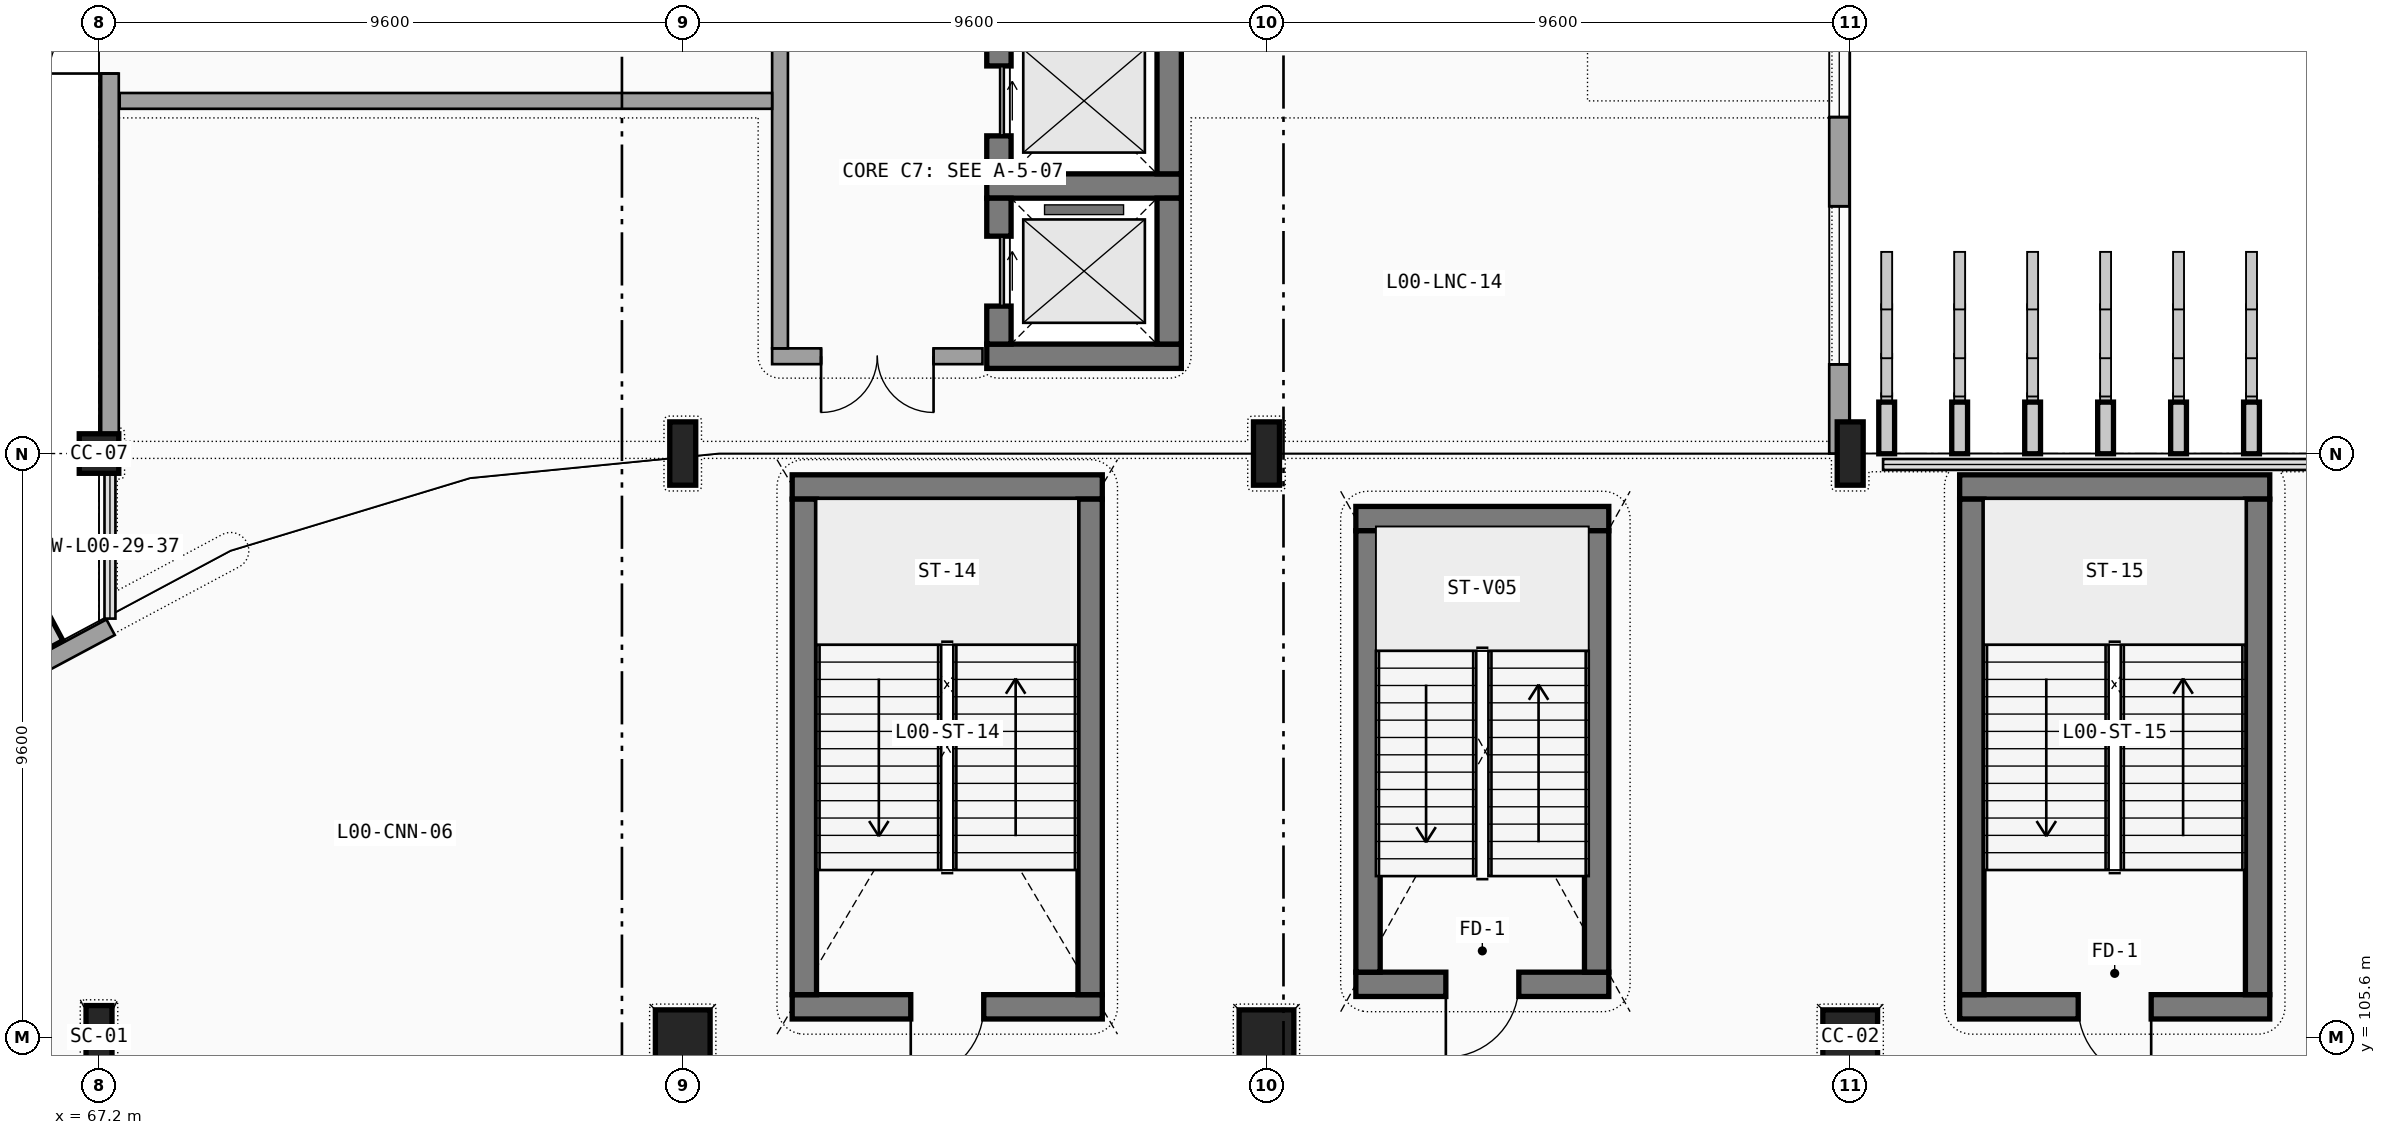
"""IFC4 building model, lengths in metres.
Left out: names, types, materials, properties, quantities, classifications, styles, units other than length and angle.
Written with IfcOpenShell. Run it as: python <this file> out.ifc"""

import sys

from ifc_helpers import new_model, si_unit, direction, frame, frame_2d, origin, origin_2d, place, context, subcontext, project, spatial, rectangle, i_section, extrude, element, fill, save


model = new_model("IFC4")
c1 = context("Model", 3, precision=1e-05, world=origin(), true_north=direction((0.0, 1.0)))
c2 = subcontext(c1, "Body", "Model", "MODEL_VIEW")
j1 = project(units=[si_unit("LENGTHUNIT", "METRE"), si_unit("PLANEANGLEUNIT", "RADIAN")], contexts=[c1])
p1 = place(None, origin())
s1 = spatial("IfcSite", under=j1, at=p1, CompositionType="ELEMENT")
p2 = place(p1, origin())
s2 = spatial("IfcBuilding", under=s1, at=p2, CompositionType="ELEMENT")
p3 = place(p2, origin())
s3 = spatial("IfcBuildingStorey", under=s2, at=p3, CompositionType="ELEMENT", Elevation=0.0)
p4 = place(p3, frame((67.2, 105.6, 0.0), z_axis=(0.0, 0.0, 1.0), x_axis=(1.0, 0.0, 0.0)))
e1 = element("IfcColumn", 1, at=p4, inside=s3, PredefinedType="COLUMN", context=c2, shape_type="SweptSolid", body=[
    extrude(i_section(OverallWidth=0.427, OverallDepth=1.042, WebThickness=0.031, FlangeThickness=0.056, FilletRadius=0.031, at=origin_2d()), origin(), (0.0, 0.0, 1.0), 4.8),
])
p5 = place(p3, frame((67.2, 115.2, 0.0), z_axis=(0.0, 0.0, 1.0), x_axis=(1.0, 0.0, 0.0)))
e2 = element("IfcColumn", 2, at=p5, inside=s3, PredefinedType="COLUMN", context=c2, shape_type="SweptSolid", body=[
    extrude(rectangle(XDim=0.65, YDim=0.65, at=origin_2d()), origin(), (0.0, 0.0, 1.0), 4.8),
])
p6 = place(p3, frame((76.8, 105.6, 0.0), z_axis=(0.0, 0.0, 1.0), x_axis=(1.0, 0.0, 0.0)))
e3 = element("IfcColumn", 3, at=p6, inside=s3, PredefinedType="COLUMN", context=c2, shape_type="SweptSolid", body=[
    extrude(rectangle(XDim=0.9, YDim=0.9, at=origin_2d()), origin(), (0.0, 0.0, 1.0), 4.8),
])
p7 = place(p3, frame((76.8, 115.2, 0.0), z_axis=(0.0, 0.0, 1.0), x_axis=(1.0, 0.0, 0.0)))
e4 = element("IfcColumn", 4, at=p7, inside=s3, PredefinedType="COLUMN", context=c2, shape_type="SweptSolid", body=[
    extrude(i_section(OverallWidth=0.427, OverallDepth=1.042, WebThickness=0.031, FlangeThickness=0.056, FilletRadius=0.031, at=origin_2d()), origin(), (0.0, 0.0, 1.0), 4.8),
])
p8 = place(p3, frame((86.4, 105.6, 0.0), z_axis=(0.0, 0.0, 1.0), x_axis=(1.0, 0.0, 0.0)))
e5 = element("IfcColumn", 5, at=p8, inside=s3, PredefinedType="COLUMN", context=c2, shape_type="SweptSolid", body=[
    extrude(rectangle(XDim=0.9, YDim=0.9, at=origin_2d()), origin(), (0.0, 0.0, 1.0), 4.8),
])
p9 = place(p3, frame((86.4, 115.2, 0.0), z_axis=(0.0, 0.0, 1.0), x_axis=(1.0, 0.0, 0.0)))
e6 = element("IfcColumn", 6, at=p9, inside=s3, PredefinedType="COLUMN", context=c2, shape_type="SweptSolid", body=[
    extrude(i_section(OverallWidth=0.427, OverallDepth=1.042, WebThickness=0.031, FlangeThickness=0.056, FilletRadius=0.031, at=origin_2d()), origin(), (0.0, 0.0, 1.0), 4.8),
])
p10 = place(p3, frame((96.0, 105.6, 0.0), z_axis=(0.0, 0.0, 1.0), x_axis=(1.0, 0.0, 0.0)))
e7 = element("IfcColumn", 7, at=p10, inside=s3, PredefinedType="COLUMN", context=c2, shape_type="SweptSolid", body=[
    extrude(rectangle(XDim=0.9, YDim=0.9, at=origin_2d()), origin(), (0.0, 0.0, 1.0), 4.8),
])
p11 = place(p3, frame((96.0, 115.2, 0.0), z_axis=(0.0, 0.0, 1.0), x_axis=(1.0, 0.0, 0.0)))
e8 = element("IfcColumn", 8, at=p11, inside=s3, PredefinedType="COLUMN", context=c2, shape_type="SweptSolid", body=[
    extrude(i_section(OverallWidth=0.427, OverallDepth=1.042, WebThickness=0.031, FlangeThickness=0.056, FilletRadius=0.031, at=origin_2d()), origin(), (0.0, 0.0, 1.0), 4.8),
])
p12 = place(p3, frame((67.38, 124.8, 0.0), z_axis=(0.0, 0.0, 1.0), x_axis=(0.0, -1.0, 0.0)))
e9 = element("IfcWall", 9, at=p12, inside=s3, PredefinedType="SOLIDWALL", context=c2, shape_type="SweptSolid", body=[
    extrude(rectangle(XDim=9.6, YDim=0.29, at=frame_2d((4.8, 0.0))), origin(), (0.0, 0.0, 1.0), 3.7),
])
p13 = place(p12, frame((3.35, 0.0, 0.0), z_axis=(0.0, 0.0, 1.0), x_axis=(-1.0, 0.0, 0.0)))
e10 = element("IfcOpeningElement", 10, at=p13, cuts=e9, PredefinedType="OPENING", context=c2, shape_type="SweptSolid", body=[
    extrude(rectangle(XDim=2.0, YDim=2.4, at=frame_2d((1.0, 1.2))), frame((0.0, 0.155, 0.0), z_axis=(0.0, -1.0, 0.0), x_axis=(1.0, 0.0, 0.0)), (0.0, 0.0, 1.0), 0.31),
])
p14 = place(p3, frame((67.391, 112.343, 0.0), z_axis=(0.0, 0.0, 1.0), x_axis=(-0.881883861215, -0.47146670649, 0.0)))
e11 = element("IfcWall", 11, at=p14, inside=s3, PredefinedType="SOLIDWALL", context=c2, shape_type="SweptSolid", body=[
    extrude(rectangle(XDim=1.904, YDim=0.29, at=frame_2d((0.952, 0.0))), origin(), (0.0, 0.0, 1.0), 3.7),
])
p15 = place(p3, frame((95.82, 115.2, 0.0), z_axis=(0.0, 0.0, 1.0), x_axis=(0.0, 1.0, 0.0)))
e12 = element("IfcWall", 12, at=p15, inside=s3, PredefinedType="SOLIDWALL", context=c2, shape_type="SweptSolid", body=[
    extrude(rectangle(XDim=9.6, YDim=0.33, at=frame_2d((4.8, 0.0))), origin(), (0.0, 0.0, 1.0), 3.573),
])
p16 = place(p15, frame((4.067, 0.0, 1.0), z_axis=(0.0, 0.0, 1.0), x_axis=(-1.0, 0.0, 0.0)))
e13 = element("IfcOpeningElement", 13, at=p16, cuts=e12, PredefinedType="OPENING", context=c2, shape_type="SweptSolid", body=[
    extrude(rectangle(XDim=2.6, YDim=2.0, at=frame_2d((1.3, 1.0))), frame((0.0, 0.175, 0.0), z_axis=(0.0, -1.0, 0.0), x_axis=(1.0, 0.0, 0.0)), (0.0, 0.0, 1.0), 0.35),
])
p17 = place(p15, frame((8.133, 0.0, 1.0), z_axis=(0.0, 0.0, 1.0), x_axis=(-1.0, 0.0, 0.0)))
e14 = element("IfcOpeningElement", 14, at=p17, cuts=e12, PredefinedType="OPENING", context=c2, shape_type="SweptSolid", body=[
    extrude(rectangle(XDim=2.6, YDim=2.0, at=frame_2d((1.3, 1.0))), frame((0.0, 0.175, 0.0), z_axis=(0.0, -1.0, 0.0), x_axis=(1.0, 0.0, 0.0)), (0.0, 0.0, 1.0), 0.35),
])
for number, where, z_axis, x_axis in (
    (15, (81.8, 116.8, 0.0), (0.0, 0.0, 1.0), (1.0, 0.0, 0.0)),
    (16, (85.0, 119.6, 0.0), (0.0, 0.0, 1.0), (-1.0, 0.0, 0.0)),
):
    element("IfcWall", number, at=place(p3, frame(where, z_axis=z_axis, x_axis=x_axis)), inside=s3, PredefinedType="SHEAR", context=c2, shape_type="SweptSolid", body=[
        extrude(rectangle(XDim=3.2, YDim=0.4, at=frame_2d((1.6, 0.0))), origin(), (0.0, 0.0, 1.0), 4.5),
    ])
p18 = place(p3, frame((82.0, 119.4, 0.0), z_axis=(0.0, 0.0, 1.0), x_axis=(0.0, -1.0, 0.0)))
e17 = element("IfcWall", 17, at=p18, inside=s3, PredefinedType="SHEAR", context=c2, shape_type="SweptSolid", body=[
    extrude(rectangle(XDim=2.4, YDim=0.4, at=frame_2d((1.2, 0.0))), origin(), (0.0, 0.0, 1.0), 4.5),
])
p19 = place(p18, frame((0.625, 0.0, 0.0), z_axis=(0.0, 0.0, 1.0), x_axis=(1.0, 0.0, 0.0)))
e18 = element("IfcOpeningElement", 18, at=p19, cuts=e17, PredefinedType="OPENING", context=c2, shape_type="SweptSolid", body=[
    extrude(rectangle(XDim=1.15, YDim=2.2, at=frame_2d((0.575, 1.1))), frame((0.0, 0.21, 0.0), z_axis=(0.0, -1.0, 0.0), x_axis=(1.0, 0.0, 0.0)), (0.0, 0.0, 1.0), 0.42),
])
p20 = place(p3, frame((84.8, 117.0, 0.0), z_axis=(0.0, 0.0, 1.0), x_axis=(0.0, 1.0, 0.0)))
e19 = element("IfcWall", 19, at=p20, inside=s3, PredefinedType="SHEAR", context=c2, shape_type="SweptSolid", body=[
    extrude(rectangle(XDim=2.4, YDim=0.4, at=frame_2d((1.2, 0.0))), origin(), (0.0, 0.0, 1.0), 4.5),
])
p21 = place(p3, frame((82.0, 122.2, 0.0), z_axis=(0.0, 0.0, 1.0), x_axis=(0.0, -1.0, 0.0)))
e20 = element("IfcWall", 20, at=p21, inside=s3, PredefinedType="SHEAR", context=c2, shape_type="SweptSolid", body=[
    extrude(rectangle(XDim=2.4, YDim=0.4, at=frame_2d((1.2, 0.0))), origin(), (0.0, 0.0, 1.0), 4.5),
])
p22 = place(p21, frame((0.625, 0.0, 0.0), z_axis=(0.0, 0.0, 1.0), x_axis=(1.0, 0.0, 0.0)))
e21 = element("IfcOpeningElement", 21, at=p22, cuts=e20, PredefinedType="OPENING", context=c2, shape_type="SweptSolid", body=[
    extrude(rectangle(XDim=1.15, YDim=2.2, at=frame_2d((0.575, 1.1))), frame((0.0, 0.21, 0.0), z_axis=(0.0, -1.0, 0.0), x_axis=(1.0, 0.0, 0.0)), (0.0, 0.0, 1.0), 0.42),
])
p23 = place(p3, frame((84.8, 119.8, 0.0), z_axis=(0.0, 0.0, 1.0), x_axis=(0.0, 1.0, 0.0)))
e22 = element("IfcWall", 22, at=p23, inside=s3, PredefinedType="SHEAR", context=c2, shape_type="SweptSolid", body=[
    extrude(rectangle(XDim=2.4, YDim=0.4, at=frame_2d((1.2, 0.0))), origin(), (0.0, 0.0, 1.0), 4.5),
])
p24 = place(p3, frame((78.27, 116.8, 0.0), z_axis=(0.0, 0.0, 1.0), x_axis=(1.0, 0.0, 0.0)))
e23 = element("IfcWall", 23, at=p24, inside=s3, PredefinedType="SOLIDWALL", context=c2, shape_type="SweptSolid", body=[
    extrude(rectangle(XDim=3.46, YDim=0.26, at=frame_2d((1.73, 0.0))), origin(), (0.0, 0.0, 1.0), 4.5),
])
p25 = place(p24, frame((2.655, 0.0, 0.0), z_axis=(0.0, 0.0, 1.0), x_axis=(-1.0, 0.0, 0.0)))
e24 = element("IfcOpeningElement", 24, at=p25, cuts=e23, PredefinedType="OPENING", context=c2, shape_type="SweptSolid", body=[
    extrude(rectangle(XDim=1.85, YDim=2.25, at=frame_2d((0.925, 1.125))), frame((0.0, 0.14, 0.0), z_axis=(0.0, -1.0, 0.0), x_axis=(1.0, 0.0, 0.0)), (0.0, 0.0, 1.0), 0.28),
])
p26 = place(p3, frame((78.4, 122.27, 0.0), z_axis=(0.0, 0.0, 1.0), x_axis=(0.0, -1.0, 0.0)))
e25 = element("IfcWall", 25, at=p26, inside=s3, PredefinedType="SOLIDWALL", context=c2, shape_type="SweptSolid", body=[
    extrude(rectangle(XDim=5.34, YDim=0.26, at=frame_2d((2.67, 0.0))), origin(), (0.0, 0.0, 1.0), 4.5),
])
p27 = place(p3, frame((78.6, 106.1, 0.0), z_axis=(0.0, 0.0, 1.0), x_axis=(1.0, 0.0, 0.0)))
e26 = element("IfcWall", 26, at=p27, inside=s3, PredefinedType="SHEAR", context=c2, shape_type="SweptSolid", body=[
    extrude(rectangle(XDim=5.1, YDim=0.4, at=frame_2d((2.55, 0.0))), origin(), (0.0, 0.0, 1.0), 4.5),
])
p28 = place(p27, frame((3.15, 0.0, 0.0), z_axis=(0.0, 0.0, 1.0), x_axis=(-1.0, 0.0, 0.0)))
e27 = element("IfcOpeningElement", 27, at=p28, cuts=e26, PredefinedType="OPENING", context=c2, shape_type="SweptSolid", body=[
    extrude(rectangle(XDim=1.2, YDim=2.2, at=frame_2d((0.6, 1.1))), frame((0.0, 0.21, 0.0), z_axis=(0.0, -1.0, 0.0), x_axis=(1.0, 0.0, 0.0)), (0.0, 0.0, 1.0), 0.42),
])
p29 = place(p3, frame((83.7, 114.65, 0.0), z_axis=(0.0, 0.0, 1.0), x_axis=(-1.0, 0.0, 0.0)))
e28 = element("IfcWall", 28, at=p29, inside=s3, PredefinedType="SHEAR", context=c2, shape_type="SweptSolid", body=[
    extrude(rectangle(XDim=5.1, YDim=0.4, at=frame_2d((2.55, 0.0))), origin(), (0.0, 0.0, 1.0), 4.5),
])
for number, where, z_axis, x_axis in (
    (29, (78.8, 114.45, 0.0), (0.0, 0.0, 1.0), (0.0, -1.0, 0.0)),
    (30, (83.5, 106.3, 0.0), (0.0, 0.0, 1.0), (0.0, 1.0, 0.0)),
):
    element("IfcWall", number, at=place(p3, frame(where, z_axis=z_axis, x_axis=x_axis)), inside=s3, PredefinedType="SHEAR", context=c2, shape_type="SweptSolid", body=[
        extrude(rectangle(XDim=8.15, YDim=0.4, at=frame_2d((4.075, 0.0))), origin(), (0.0, 0.0, 1.0), 4.5),
    ])
p30 = place(p3, frame((97.8, 106.1, 0.0), z_axis=(0.0, 0.0, 1.0), x_axis=(1.0, 0.0, 0.0)))
e31 = element("IfcWall", 31, at=p30, inside=s3, PredefinedType="SHEAR", context=c2, shape_type="SweptSolid", body=[
    extrude(rectangle(XDim=5.1, YDim=0.4, at=frame_2d((2.55, 0.0))), origin(), (0.0, 0.0, 1.0), 4.5),
])
p31 = place(p30, frame((3.15, 0.0, 0.0), z_axis=(0.0, 0.0, 1.0), x_axis=(-1.0, 0.0, 0.0)))
e32 = element("IfcOpeningElement", 32, at=p31, cuts=e31, PredefinedType="OPENING", context=c2, shape_type="SweptSolid", body=[
    extrude(rectangle(XDim=1.2, YDim=2.2, at=frame_2d((0.6, 1.1))), frame((0.0, 0.21, 0.0), z_axis=(0.0, -1.0, 0.0), x_axis=(1.0, 0.0, 0.0)), (0.0, 0.0, 1.0), 0.42),
])
p32 = place(p3, frame((102.9, 114.65, 0.0), z_axis=(0.0, 0.0, 1.0), x_axis=(-1.0, 0.0, 0.0)))
e33 = element("IfcWall", 33, at=p32, inside=s3, PredefinedType="SHEAR", context=c2, shape_type="SweptSolid", body=[
    extrude(rectangle(XDim=5.1, YDim=0.4, at=frame_2d((2.55, 0.0))), origin(), (0.0, 0.0, 1.0), 4.5),
])
for number, where, z_axis, x_axis in (
    (34, (98.0, 114.45, 0.0), (0.0, 0.0, 1.0), (0.0, -1.0, 0.0)),
    (35, (102.7, 106.3, 0.0), (0.0, 0.0, 1.0), (0.0, 1.0, 0.0)),
):
    element("IfcWall", number, at=place(p3, frame(where, z_axis=z_axis, x_axis=x_axis)), inside=s3, PredefinedType="SHEAR", context=c2, shape_type="SweptSolid", body=[
        extrude(rectangle(XDim=8.15, YDim=0.4, at=frame_2d((4.075, 0.0))), origin(), (0.0, 0.0, 1.0), 4.5),
    ])
p33 = place(p3, frame((87.87, 106.47, 0.0), z_axis=(0.0, 0.0, 1.0), x_axis=(1.0, 0.0, 0.0)))
e36 = element("IfcWall", 36, at=p33, inside=s3, PredefinedType="SHEAR", context=c2, shape_type="SweptSolid", body=[
    extrude(rectangle(XDim=4.16, YDim=0.4, at=frame_2d((2.08, 0.0))), origin(), (0.0, 0.0, 1.0), 4.5),
])
p34 = place(p33, frame((2.68, 0.0, 0.0), z_axis=(0.0, 0.0, 1.0), x_axis=(-1.0, 0.0, 0.0)))
e37 = element("IfcOpeningElement", 37, at=p34, cuts=e36, PredefinedType="OPENING", context=c2, shape_type="SweptSolid", body=[
    extrude(rectangle(XDim=1.2, YDim=2.2, at=frame_2d((0.6, 1.1))), frame((0.0, 0.21, 0.0), z_axis=(0.0, -1.0, 0.0), x_axis=(1.0, 0.0, 0.0)), (0.0, 0.0, 1.0), 0.42),
])
p35 = place(p3, frame((92.03, 114.13, 0.0), z_axis=(0.0, 0.0, 1.0), x_axis=(-1.0, 0.0, 0.0)))
e38 = element("IfcWall", 38, at=p35, inside=s3, PredefinedType="SHEAR", context=c2, shape_type="SweptSolid", body=[
    extrude(rectangle(XDim=4.16, YDim=0.4, at=frame_2d((2.08, 0.0))), origin(), (0.0, 0.0, 1.0), 4.5),
])
for number, where, z_axis, x_axis in (
    (39, (88.07, 113.93, 0.0), (0.0, 0.0, 1.0), (0.0, -1.0, 0.0)),
    (40, (91.83, 106.67, 0.0), (0.0, 0.0, 1.0), (0.0, 1.0, 0.0)),
):
    element("IfcWall", number, at=place(p3, frame(where, z_axis=z_axis, x_axis=x_axis)), inside=s3, PredefinedType="SHEAR", context=c2, shape_type="SweptSolid", body=[
        extrude(rectangle(XDim=7.26, YDim=0.4, at=frame_2d((3.63, 0.0))), origin(), (0.0, 0.0, 1.0), 4.5),
    ])
p36 = place(p3, frame((67.54, 121.0, 0.0), z_axis=(0.0, 0.0, 1.0), x_axis=(1.0, 0.0, 0.0)))
e41 = element("IfcWall", 41, at=p36, inside=s3, PredefinedType="SOLIDWALL", context=c2, shape_type="SweptSolid", body=[
    extrude(rectangle(XDim=10.73, YDim=0.26, at=frame_2d((5.365, 0.0))), origin(), (0.0, 0.0, 1.0), 3.7),
])
p37 = place(p13, origin())
e42 = element("IfcDoor", 42, at=p37, inside=s3, OperationType="DOUBLE_DOOR_SINGLE_SWING", PredefinedType="DOOR", context=c2, shape_type="SweptSolid", body=[
    extrude(rectangle(XDim=2.0, YDim=2.4, at=frame_2d((1.0, 1.2))), frame((0.0, 0.025, 0.0), z_axis=(0.0, -1.0, 0.0), x_axis=(1.0, 0.0, 0.0)), (0.0, 0.0, 1.0), 0.05),
])
fill(e10, e42)
p38 = place(p16, origin())
e43 = element("IfcWindow", 43, at=p38, inside=s3, PartitioningType="SINGLE_PANEL", PredefinedType="WINDOW", context=c2, shape_type="SweptSolid", body=[
    extrude(rectangle(XDim=2.6, YDim=2.0, at=frame_2d((1.3, 1.0))), frame((0.0, 0.03, 0.0), z_axis=(0.0, -1.0, 0.0), x_axis=(1.0, 0.0, 0.0)), (0.0, 0.0, 1.0), 0.06),
])
fill(e13, e43)
p39 = place(p17, origin())
e44 = element("IfcWindow", 44, at=p39, inside=s3, PartitioningType="SINGLE_PANEL", PredefinedType="WINDOW", context=c2, shape_type="SweptSolid", body=[
    extrude(rectangle(XDim=2.6, YDim=2.0, at=frame_2d((1.3, 1.0))), frame((0.0, 0.03, 0.0), z_axis=(0.0, -1.0, 0.0), x_axis=(1.0, 0.0, 0.0)), (0.0, 0.0, 1.0), 0.06),
])
fill(e14, e44)
p40 = place(p19, origin())
e45 = element("IfcDoor", 45, at=p40, inside=s3, OperationType="SLIDING_TO_LEFT", PredefinedType="DOOR", context=c2, shape_type="SweptSolid", body=[
    extrude(rectangle(XDim=1.15, YDim=2.2, at=frame_2d((0.575, 1.1))), frame((0.0, 0.025, 0.0), z_axis=(0.0, -1.0, 0.0), x_axis=(1.0, 0.0, 0.0)), (0.0, 0.0, 1.0), 0.05),
])
fill(e18, e45)
p41 = place(p22, origin())
e46 = element("IfcDoor", 46, at=p41, inside=s3, OperationType="SLIDING_TO_LEFT", PredefinedType="DOOR", context=c2, shape_type="SweptSolid", body=[
    extrude(rectangle(XDim=1.15, YDim=2.2, at=frame_2d((0.575, 1.1))), frame((0.0, 0.025, 0.0), z_axis=(0.0, -1.0, 0.0), x_axis=(1.0, 0.0, 0.0)), (0.0, 0.0, 1.0), 0.05),
])
fill(e21, e46)
p42 = place(p25, origin())
e47 = element("IfcDoor", 47, at=p42, inside=s3, OperationType="DOUBLE_DOOR_SINGLE_SWING", PredefinedType="DOOR", context=c2, shape_type="SweptSolid", body=[
    extrude(rectangle(XDim=1.85, YDim=2.25, at=frame_2d((0.925, 1.125))), frame((0.0, 0.025, 0.0), z_axis=(0.0, -1.0, 0.0), x_axis=(1.0, 0.0, 0.0)), (0.0, 0.0, 1.0), 0.05),
])
fill(e24, e47)
p43 = place(p28, origin())
e48 = element("IfcDoor", 48, at=p43, inside=s3, OperationType="SINGLE_SWING_RIGHT", PredefinedType="DOOR", context=c2, shape_type="SweptSolid", body=[
    extrude(rectangle(XDim=1.2, YDim=2.2, at=frame_2d((0.6, 1.1))), frame((0.0, 0.025, 0.0), z_axis=(0.0, -1.0, 0.0), x_axis=(1.0, 0.0, 0.0)), (0.0, 0.0, 1.0), 0.05),
])
fill(e27, e48)
p44 = place(p31, origin())
e49 = element("IfcDoor", 49, at=p44, inside=s3, OperationType="SINGLE_SWING_LEFT", PredefinedType="DOOR", context=c2, shape_type="SweptSolid", body=[
    extrude(rectangle(XDim=1.2, YDim=2.2, at=frame_2d((0.6, 1.1))), frame((0.0, 0.025, 0.0), z_axis=(0.0, -1.0, 0.0), x_axis=(1.0, 0.0, 0.0)), (0.0, 0.0, 1.0), 0.05),
])
fill(e32, e49)
p45 = place(p34, origin())
e50 = element("IfcDoor", 50, at=p45, inside=s3, OperationType="SINGLE_SWING_RIGHT", PredefinedType="DOOR", context=c2, shape_type="SweptSolid", body=[
    extrude(rectangle(XDim=1.2, YDim=2.2, at=frame_2d((0.6, 1.1))), frame((0.0, 0.025, 0.0), z_axis=(0.0, -1.0, 0.0), x_axis=(1.0, 0.0, 0.0)), (0.0, 0.0, 1.0), 0.05),
])
fill(e37, e50)
save(model, sys.argv[1])
